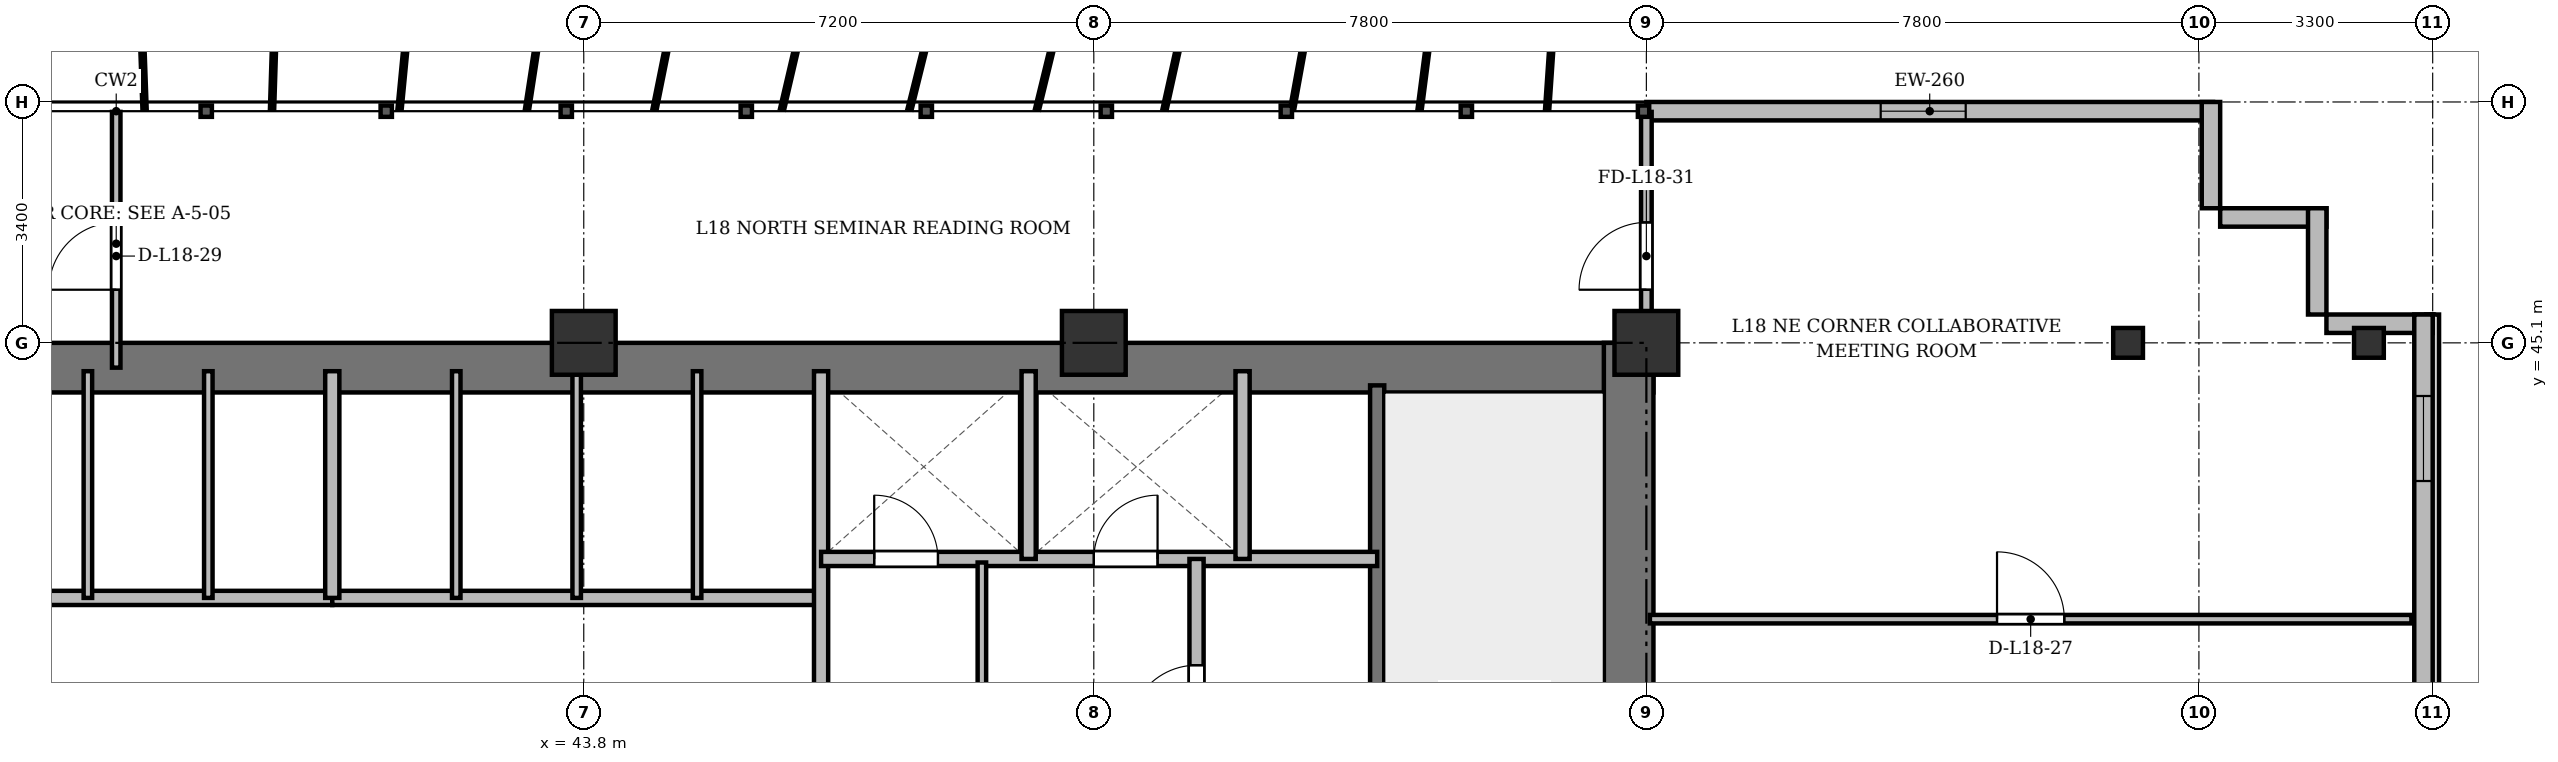
"""IFC4 building model, lengths in metres.
Left out: names, types, materials, properties, quantities, classifications, styles, units other than length and angle.
Written with IfcOpenShell. Run it as: python <this file> out.ifc"""

import sys

from ifc_helpers import new_model, si_unit, direction, frame, frame_2d, origin, origin_2d, place, context, subcontext, project, spatial, rectangle, i_section, extrude, source, transform, mapped, element, fill, save


model = new_model("IFC4")
c1 = context("Model", 3, precision=1e-05, world=origin(), true_north=direction((0.0, 1.0)))
c2 = subcontext(c1, "Body", "Model", "MODEL_VIEW")
j1 = project(units=[si_unit("LENGTHUNIT", "METRE"), si_unit("PLANEANGLEUNIT", "RADIAN")], contexts=[c1])
p1 = place(None, origin())
s1 = spatial("IfcSite", under=j1, at=p1, CompositionType="ELEMENT")
p2 = place(p1, origin())
s2 = spatial("IfcBuilding", under=s1, at=p2, CompositionType="ELEMENT")
p3 = place(p2, frame((0.0, 0.0, 70.3)))
s3 = spatial("IfcBuildingStorey", under=s2, at=p3, CompositionType="ELEMENT", Elevation=70.3)
m1 = source(origin(), c2, "Body", "SweptSolid", [
    extrude(rectangle(XDim=0.9, YDim=0.9, at=origin_2d()), origin(), (0.0, 0.0, 1.0), 3.6),
])
for number, where, z_axis, x_axis in (
    (1, (43.8, 45.1, 0.0), (0.0, 0.0, 1.0), (1.0, 0.0, 0.0)),
    (2, (51.0, 45.1, 0.0), (0.0, 0.0, 1.0), (1.0, 0.0, 0.0)),
    (3, (58.8, 45.1, 0.0), (0.0, 0.0, 1.0), (1.0, 0.0, 0.0)),
):
    element("IfcColumn", number, at=place(p3, frame(where, z_axis=z_axis, x_axis=x_axis)), inside=s3, PredefinedType="COLUMN", context=c2, shape_type="MappedRepresentation", body=[
        mapped(m1, transform((0.0, 0.0, 0.0), x_axis=(1.0, 0.0, 0.0), y_axis=(0.0, 1.0, 0.0), z_axis=(0.0, 0.0, 1.0), scale=1.0)),
    ])
m2 = source(origin(), c2, "Body", "SweptSolid", [
    extrude(i_section(OverallWidth=0.42, OverallDepth=0.42, WebThickness=0.026, FlangeThickness=0.04, at=origin_2d()), origin(), (0.0, 0.0, 1.0), 3.6),
])
for number, where, z_axis, x_axis in (
    (4, (65.6, 45.1, 0.0), (0.0, 0.0, 1.0), (1.0, 0.0, 0.0)),
    (5, (69.0, 45.1, 0.0), (0.0, 0.0, 1.0), (1.0, 0.0, 0.0)),
):
    element("IfcColumn", number, at=place(p3, frame(where, z_axis=z_axis, x_axis=x_axis)), inside=s3, PredefinedType="COLUMN", context=c2, shape_type="MappedRepresentation", body=[
        mapped(m2, transform((0.0, 0.0, 0.0), x_axis=(1.0, 0.0, 0.0), y_axis=(0.0, 1.0, 0.0), z_axis=(0.0, 0.0, 1.0), scale=1.0)),
    ])
p4 = place(p3, frame((58.8, 48.37, 0.0), z_axis=(0.0, 0.0, 1.0), x_axis=(1.0, 0.0, 0.0)))
e6 = element("IfcWall", 6, at=p4, inside=s3, PredefinedType="SOLIDWALL", context=c2, shape_type="SweptSolid", body=[
    extrude(rectangle(XDim=8.0, YDim=0.26, at=frame_2d((4.0, 0.0))), origin(), (0.0, 0.0, 1.0), 3.22),
])
p5 = place(p4, frame((3.308, 0.0, 0.9)))
e7 = element("IfcOpeningElement", 7, at=p5, cuts=e6, PredefinedType="OPENING", context=c2, shape_type="SweptSolid", body=[
    extrude(rectangle(XDim=1.2, YDim=1.65, at=frame_2d((0.6, 0.825))), frame((0.0, 0.14, 0.0), z_axis=(0.0, -1.0, 0.0), x_axis=(1.0, 0.0, 0.0)), (0.0, 0.0, 1.0), 0.28),
])
for number, where, z_axis, x_axis in (
    (8, (66.77, 48.5, 0.0), (0.0, 0.0, 1.0), (0.0, -1.0, 0.0)),
    (9, (66.9, 46.87, 0.0), (0.0, 0.0, 1.0), (1.0, 0.0, 0.0)),
    (10, (68.27, 47.0, 0.0), (0.0, 0.0, 1.0), (0.0, -1.0, 0.0)),
):
    element("IfcWall", number, at=place(p3, frame(where, z_axis=z_axis, x_axis=x_axis)), inside=s3, PredefinedType="SOLIDWALL", context=c2, shape_type="SweptSolid", body=[
        extrude(rectangle(XDim=1.5, YDim=0.26, at=frame_2d((0.75, 0.0))), origin(), (0.0, 0.0, 1.0), 3.22),
    ])
p6 = place(p3, frame((68.4, 45.37, 0.0), z_axis=(0.0, 0.0, 1.0), x_axis=(1.0, 0.0, 0.0)))
e11 = element("IfcWall", 11, at=p6, inside=s3, PredefinedType="SOLIDWALL", context=c2, shape_type="SweptSolid", body=[
    extrude(rectangle(XDim=1.5, YDim=0.26, at=frame_2d((0.75, 0.0))), origin(), (0.0, 0.0, 1.0), 2.57),
])
p7 = place(p3, frame((69.77, 45.5, 0.0), z_axis=(0.0, 0.0, 1.0), x_axis=(0.0, -1.0, 0.0)))
e12 = element("IfcWall", 12, at=p7, inside=s3, PredefinedType="SOLIDWALL", context=c2, shape_type="SweptSolid", body=[
    extrude(rectangle(XDim=39.6, YDim=0.26, at=frame_2d((19.8, 0.0))), origin(), (0.0, 0.0, 1.0), 3.22),
])
p8 = place(p7, frame((36.95, 0.0, 0.92)))
e13 = element("IfcOpeningElement", 13, at=p8, cuts=e12, PredefinedType="OPENING", context=c2, shape_type="SweptSolid", body=[
    extrude(rectangle(XDim=1.2, YDim=1.65, at=frame_2d((0.6, 0.825))), frame((0.0, 0.14, 0.0), z_axis=(0.0, -1.0, 0.0), x_axis=(1.0, 0.0, 0.0)), (0.0, 0.0, 1.0), 0.28),
])
p9 = place(p7, frame((32.8, 0.0, 0.92)))
e14 = element("IfcOpeningElement", 14, at=p9, cuts=e12, PredefinedType="OPENING", context=c2, shape_type="SweptSolid", body=[
    extrude(rectangle(XDim=2.6, YDim=1.9, at=frame_2d((1.3, 0.95))), frame((0.0, 0.14, 0.0), z_axis=(0.0, -1.0, 0.0), x_axis=(1.0, 0.0, 0.0)), (0.0, 0.0, 1.0), 0.28),
])
p10 = place(p7, frame((28.6, 0.0, 0.92)))
e15 = element("IfcOpeningElement", 15, at=p10, cuts=e12, PredefinedType="OPENING", context=c2, shape_type="SweptSolid", body=[
    extrude(rectangle(XDim=2.6, YDim=1.9, at=frame_2d((1.3, 0.95))), frame((0.0, 0.14, 0.0), z_axis=(0.0, -1.0, 0.0), x_axis=(1.0, 0.0, 0.0)), (0.0, 0.0, 1.0), 0.28),
])
p11 = place(p7, frame((7.4, 0.0, 0.92)))
e16 = element("IfcOpeningElement", 16, at=p11, cuts=e12, PredefinedType="OPENING", context=c2, shape_type="SweptSolid", body=[
    extrude(rectangle(XDim=2.6, YDim=1.9, at=frame_2d((1.3, 0.95))), frame((0.0, 0.14, 0.0), z_axis=(0.0, -1.0, 0.0), x_axis=(1.0, 0.0, 0.0)), (0.0, 0.0, 1.0), 0.28),
])
p12 = place(p7, frame((1.15, 0.0, 0.92)))
e17 = element("IfcOpeningElement", 17, at=p12, cuts=e12, PredefinedType="OPENING", context=c2, shape_type="SweptSolid", body=[
    extrude(rectangle(XDim=1.2, YDim=1.65, at=frame_2d((0.6, 0.825))), frame((0.0, 0.14, 0.0), z_axis=(0.0, -1.0, 0.0), x_axis=(1.0, 0.0, 0.0)), (0.0, 0.0, 1.0), 0.28),
])
p13 = place(p3, frame((15.5, 44.75, 0.0), z_axis=(0.0, 0.0, 1.0), x_axis=(1.0, 0.0, 0.0)))
e18 = element("IfcWall", 18, at=p13, inside=s3, PredefinedType="SHEAR", context=c2, shape_type="SweptSolid", body=[
    extrude(rectangle(XDim=43.4, YDim=0.7, at=frame_2d((21.7, 0.0))), origin(), (0.0, 0.0, 1.0), 3.22),
])
p14 = place(p3, frame((58.55, 33.4, 0.0), z_axis=(0.0, 0.0, 1.0), x_axis=(0.0, 1.0, 0.0)))
e19 = element("IfcWall", 19, at=p14, inside=s3, PredefinedType="SHEAR", context=c2, shape_type="SweptSolid", body=[
    extrude(rectangle(XDim=11.7, YDim=0.7, at=frame_2d((5.85, 0.0))), origin(), (0.0, 0.0, 1.0), 3.22),
])
p15 = place(p3, frame((55.0, 33.4, 0.0), z_axis=(0.0, 0.0, 1.0), x_axis=(0.0, 1.0, 0.0)))
e20 = element("IfcWall", 20, at=p15, inside=s3, PredefinedType="SHEAR", context=c2, shape_type="SweptSolid", body=[
    extrude(rectangle(XDim=11.1, YDim=0.2, at=frame_2d((5.55, 0.0))), origin(), (0.0, 0.0, 1.0), 3.22),
])
p16 = place(p15, frame((0.85, 0.0, 0.0)))
e21 = element("IfcOpeningElement", 21, at=p16, cuts=e20, PredefinedType="OPENING", context=c2, shape_type="SweptSolid", body=[
    extrude(rectangle(XDim=1.1, YDim=2.15, at=frame_2d((0.55, 1.075))), frame((0.0, 0.11, 0.0), z_axis=(0.0, -1.0, 0.0), x_axis=(1.0, 0.0, 0.0)), (0.0, 0.0, 1.0), 0.22),
])
p17 = place(p3, frame((33.35, 41.5, 0.0), z_axis=(0.0, 0.0, 1.0), x_axis=(1.0, 0.0, 0.0)))
e22 = element("IfcWall", 22, at=p17, inside=s3, PredefinedType="SOLIDWALL", context=c2, shape_type="SweptSolid", body=[
    extrude(rectangle(XDim=6.9, YDim=0.2, at=frame_2d((3.45, 0.0))), origin(), (0.0, 0.0, 1.0), 3.22),
])
for number, where, z_axis, x_axis in (
    (23, (36.8, 41.5, 0.0), (0.0, 0.0, 1.0), (0.0, 1.0, 0.0)),
    (24, (38.5, 41.5, 0.0), (0.0, 0.0, 1.0), (0.0, 1.0, 0.0)),
):
    element("IfcWall", number, at=place(p3, frame(where, z_axis=z_axis, x_axis=x_axis)), inside=s3, PredefinedType="PARTITIONING", context=c2, shape_type="SweptSolid", body=[
        extrude(rectangle(XDim=3.2, YDim=0.12, at=frame_2d((1.6, 0.0))), origin(), (0.0, 0.0, 1.0), 3.22),
    ])
p18 = place(p3, frame((40.25, 41.5, 0.0), z_axis=(0.0, 0.0, 1.0), x_axis=(1.0, 0.0, 0.0)))
e25 = element("IfcWall", 25, at=p18, inside=s3, PredefinedType="SOLIDWALL", context=c2, shape_type="SweptSolid", body=[
    extrude(rectangle(XDim=6.9, YDim=0.2, at=frame_2d((3.45, 0.0))), origin(), (0.0, 0.0, 1.0), 2.632),
])
p19 = place(p3, frame((40.25, 41.5, 0.0), z_axis=(0.0, 0.0, 1.0), x_axis=(0.0, 1.0, 0.0)))
e26 = element("IfcWall", 26, at=p19, inside=s3, PredefinedType="SOLIDWALL", context=c2, shape_type="SweptSolid", body=[
    extrude(rectangle(XDim=3.2, YDim=0.2, at=frame_2d((1.6, 0.0))), origin(), (0.0, 0.0, 1.0), 3.22),
])
p20 = place(p3, frame((42.0, 41.5, 0.0), z_axis=(0.0, 0.0, 1.0), x_axis=(0.0, 1.0, 0.0)))
e27 = element("IfcWall", 27, at=p20, inside=s3, PredefinedType="PARTITIONING", context=c2, shape_type="SweptSolid", body=[
    extrude(rectangle(XDim=3.2, YDim=0.12, at=frame_2d((1.6, 0.0))), origin(), (0.0, 0.0, 1.0), 3.22),
])
p21 = place(p3, frame((43.7, 41.5, 0.0), z_axis=(0.0, 0.0, 1.0), x_axis=(0.0, 1.0, 0.0)))
e28 = element("IfcWall", 28, at=p21, inside=s3, PredefinedType="PARTITIONING", context=c2, shape_type="SweptSolid", body=[
    extrude(rectangle(XDim=3.2, YDim=0.12, at=frame_2d((1.6, 0.0))), origin(), (0.0, 0.0, 1.0), 2.632),
])
p22 = place(p3, frame((45.4, 41.5, 0.0), z_axis=(0.0, 0.0, 1.0), x_axis=(0.0, 1.0, 0.0)))
e29 = element("IfcWall", 29, at=p22, inside=s3, PredefinedType="PARTITIONING", context=c2, shape_type="SweptSolid", body=[
    extrude(rectangle(XDim=3.2, YDim=0.12, at=frame_2d((1.6, 0.0))), origin(), (0.0, 0.0, 1.0), 3.22),
])
p23 = place(p3, frame((47.15, 33.4, 0.0), z_axis=(0.0, 0.0, 1.0), x_axis=(0.0, 1.0, 0.0)))
e30 = element("IfcWall", 30, at=p23, inside=s3, PredefinedType="SOLIDWALL", context=c2, shape_type="SweptSolid", body=[
    extrude(rectangle(XDim=11.3, YDim=0.2, at=frame_2d((5.65, 0.0))), origin(), (0.0, 0.0, 1.0), 2.57),
])
p24 = place(p3, frame((47.15, 42.05, 0.0), z_axis=(0.0, 0.0, 1.0), x_axis=(1.0, 0.0, 0.0)))
e31 = element("IfcWall", 31, at=p24, inside=s3, PredefinedType="SOLIDWALL", context=c2, shape_type="SweptSolid", body=[
    extrude(rectangle(XDim=7.85, YDim=0.2, at=frame_2d((3.925, 0.0))), origin(), (0.0, 0.0, 1.0), 2.632),
])
p25 = place(p24, frame((0.75, 0.0, 0.0)))
e32 = element("IfcOpeningElement", 32, at=p25, cuts=e31, PredefinedType="OPENING", context=c2, shape_type="SweptSolid", body=[
    extrude(rectangle(XDim=0.9, YDim=2.1, at=frame_2d((0.45, 1.05))), frame((0.0, 0.11, 0.0), z_axis=(0.0, -1.0, 0.0), x_axis=(1.0, 0.0, 0.0)), (0.0, 0.0, 1.0), 0.22),
])
p26 = place(p24, frame((3.85, 0.0, 0.0)))
e33 = element("IfcOpeningElement", 33, at=p26, cuts=e31, PredefinedType="OPENING", context=c2, shape_type="SweptSolid", body=[
    extrude(rectangle(XDim=0.9, YDim=2.1, at=frame_2d((0.45, 1.05))), frame((0.0, 0.11, 0.0), z_axis=(0.0, -1.0, 0.0), x_axis=(1.0, 0.0, 0.0)), (0.0, 0.0, 1.0), 0.22),
])
for number, where, z_axis, x_axis in (
    (34, (50.08, 42.05, 0.0), (0.0, 0.0, 1.0), (0.0, 1.0, 0.0)),
    (35, (53.1, 42.05, 0.0), (0.0, 0.0, 1.0), (0.0, 1.0, 0.0)),
):
    element("IfcWall", number, at=place(p3, frame(where, z_axis=z_axis, x_axis=x_axis)), inside=s3, PredefinedType="SOLIDWALL", context=c2, shape_type="SweptSolid", body=[
        extrude(rectangle(XDim=2.65, YDim=0.2, at=frame_2d((1.325, 0.0))), origin(), (0.0, 0.0, 1.0), 3.22),
    ])
p27 = place(p3, frame((52.45, 33.4, 0.0), z_axis=(0.0, 0.0, 1.0), x_axis=(0.0, 1.0, 0.0)))
e36 = element("IfcWall", 36, at=p27, inside=s3, PredefinedType="PARTITIONING", context=c2, shape_type="SweptSolid", body=[
    extrude(rectangle(XDim=8.65, YDim=0.2, at=frame_2d((4.325, 0.0))), origin(), (0.0, 0.0, 1.0), 2.57),
])
p28 = place(p27, frame((6.2, 0.0, 0.0)))
e37 = element("IfcOpeningElement", 37, at=p28, cuts=e36, PredefinedType="OPENING", context=c2, shape_type="SweptSolid", body=[
    extrude(rectangle(XDim=0.95, YDim=2.15, at=frame_2d((0.475, 1.075))), frame((0.0, 0.11, 0.0), z_axis=(0.0, -1.0, 0.0), x_axis=(1.0, 0.0, 0.0)), (0.0, 0.0, 1.0), 0.22),
])
p29 = place(p3, frame((49.42, 33.4, 0.0), z_axis=(0.0, 0.0, 1.0), x_axis=(0.0, 1.0, 0.0)))
e38 = element("IfcWall", 38, at=p29, inside=s3, PredefinedType="PARTITIONING", context=c2, shape_type="SweptSolid", body=[
    extrude(rectangle(XDim=8.6, YDim=0.12, at=frame_2d((4.3, 0.0))), origin(), (0.0, 0.0, 1.0), 2.57),
])
p30 = place(p29, frame((1.3, 0.0, 0.0)))
e39 = element("IfcOpeningElement", 39, at=p30, cuts=e38, PredefinedType="OPENING", context=c2, shape_type="SweptSolid", body=[
    extrude(rectangle(XDim=0.95, YDim=2.15, at=frame_2d((0.475, 1.075))), frame((0.0, 0.07, 0.0), z_axis=(0.0, -1.0, 0.0), x_axis=(1.0, 0.0, 0.0)), (0.0, 0.0, 1.0), 0.14),
])
p31 = place(p29, frame((5.5, 0.0, 0.0)))
e40 = element("IfcOpeningElement", 40, at=p31, cuts=e38, PredefinedType="OPENING", context=c2, shape_type="SweptSolid", body=[
    extrude(rectangle(XDim=0.95, YDim=2.15, at=frame_2d((0.475, 1.075))), frame((0.0, 0.07, 0.0), z_axis=(0.0, -1.0, 0.0), x_axis=(1.0, 0.0, 0.0)), (0.0, 0.0, 1.0), 0.14),
])
p32 = place(p3, frame((58.85, 41.2, 0.0), z_axis=(0.0, 0.0, 1.0), x_axis=(1.0, 0.0, 0.0)))
e41 = element("IfcWall", 41, at=p32, inside=s3, PredefinedType="PARTITIONING", context=c2, shape_type="SweptSolid", body=[
    extrude(rectangle(XDim=10.75, YDim=0.12, at=frame_2d((5.375, 0.0))), origin(), (0.0, 0.0, 1.0), 2.632),
])
p33 = place(p32, frame((4.9, 0.0, 0.0)))
e42 = element("IfcOpeningElement", 42, at=p33, cuts=e41, PredefinedType="OPENING", context=c2, shape_type="SweptSolid", body=[
    extrude(rectangle(XDim=0.95, YDim=2.15, at=frame_2d((0.475, 1.075))), frame((0.0, 0.07, 0.0), z_axis=(0.0, -1.0, 0.0), x_axis=(1.0, 0.0, 0.0)), (0.0, 0.0, 1.0), 0.14),
])
p34 = place(p3, frame((37.2, 44.75, 0.0), z_axis=(0.0, 0.0, 1.0), x_axis=(0.0, 1.0, 0.0)))
e43 = element("IfcWall", 43, at=p34, inside=s3, PredefinedType="PARTITIONING", context=c2, shape_type="SweptSolid", body=[
    extrude(rectangle(XDim=3.61, YDim=0.12, at=frame_2d((1.805, 0.0))), origin(), (0.0, 0.0, 1.0), 2.57),
])
p35 = place(p34, frame((1.1, 0.0, 0.0)))
e44 = element("IfcOpeningElement", 44, at=p35, cuts=e43, PredefinedType="OPENING", context=c2, shape_type="SweptSolid", body=[
    extrude(rectangle(XDim=0.95, YDim=2.15, at=frame_2d((0.475, 1.075))), frame((0.0, 0.07, 0.0), z_axis=(0.0, -1.0, 0.0), x_axis=(1.0, 0.0, 0.0)), (0.0, 0.0, 1.0), 0.14),
])
p36 = place(p3, frame((58.8, 44.75, 0.0), z_axis=(0.0, 0.0, 1.0), x_axis=(0.0, 1.0, 0.0)))
e45 = element("IfcWall", 45, at=p36, inside=s3, PredefinedType="PARTITIONING", context=c2, shape_type="SweptSolid", body=[
    extrude(rectangle(XDim=3.61, YDim=0.15, at=frame_2d((1.805, 0.0))), origin(), (0.0, 0.0, 1.0), 2.632),
])
p37 = place(p36, frame((1.1, 0.0, 0.0)))
e46 = element("IfcOpeningElement", 46, at=p37, cuts=e45, PredefinedType="OPENING", context=c2, shape_type="SweptSolid", body=[
    extrude(rectangle(XDim=0.95, YDim=2.15, at=frame_2d((0.475, 1.075))), frame((0.0, 0.085, 0.0), z_axis=(0.0, -1.0, 0.0), x_axis=(1.0, 0.0, 0.0)), (0.0, 0.0, 1.0), 0.17),
])
m3 = source(origin(), c2, "Body", "SweptSolid", [
    extrude(rectangle(XDim=1.2, YDim=1.65, at=frame_2d((0.6, 0.825))), frame((0.0, 0.03, 0.0), z_axis=(0.0, -1.0, 0.0), x_axis=(1.0, 0.0, 0.0)), (0.0, 0.0, 1.0), 0.06),
])
p38 = place(p5, origin())
e47 = element("IfcWindow", 47, at=p38, inside=s3, PartitioningType="SINGLE_PANEL", PredefinedType="WINDOW", context=c2, shape_type="MappedRepresentation", body=[
    mapped(m3, transform((0.0, 0.0, 0.0), x_axis=(1.0, 0.0, 0.0), y_axis=(0.0, 1.0, 0.0), z_axis=(0.0, 0.0, 1.0), scale=1.0)),
])
fill(e7, e47)
p39 = place(p12, origin())
e48 = element("IfcWindow", 48, at=p39, inside=s3, PartitioningType="SINGLE_PANEL", PredefinedType="WINDOW", context=c2, shape_type="MappedRepresentation", body=[
    mapped(m3, transform((0.0, 0.0, 0.0), x_axis=(1.0, 0.0, 0.0), y_axis=(0.0, 1.0, 0.0), z_axis=(0.0, 0.0, 1.0), scale=1.0)),
])
fill(e17, e48)
m4 = source(origin(), c2, "Body", "SweptSolid", [
    extrude(rectangle(XDim=0.9, YDim=2.1, at=frame_2d((0.45, 1.05))), frame((0.0, 0.025, 0.0), z_axis=(0.0, -1.0, 0.0), x_axis=(1.0, 0.0, 0.0)), (0.0, 0.0, 1.0), 0.05),
])
p40 = place(p25, origin())
e49 = element("IfcDoor", 49, at=p40, inside=s3, OperationType="SINGLE_SWING_LEFT", PredefinedType="DOOR", context=c2, shape_type="MappedRepresentation", body=[
    mapped(m4, transform((0.0, 0.0, 0.0), x_axis=(1.0, 0.0, 0.0), y_axis=(0.0, 1.0, 0.0), z_axis=(0.0, 0.0, 1.0), scale=1.0)),
])
fill(e32, e49)
p41 = place(p26, origin())
e50 = element("IfcDoor", 50, at=p41, inside=s3, OperationType="SINGLE_SWING_RIGHT", PredefinedType="DOOR", context=c2, shape_type="MappedRepresentation", body=[
    mapped(m4, transform((0.0, 0.0, 0.0), x_axis=(1.0, 0.0, 0.0), y_axis=(0.0, 1.0, 0.0), z_axis=(0.0, 0.0, 1.0), scale=1.0)),
])
fill(e33, e50)
m5 = source(origin(), c2, "Body", "SweptSolid", [
    extrude(rectangle(XDim=0.95, YDim=2.15, at=frame_2d((0.475, 1.075))), frame((0.0, 0.025, 0.0), z_axis=(0.0, -1.0, 0.0), x_axis=(1.0, 0.0, 0.0)), (0.0, 0.0, 1.0), 0.05),
])
p42 = place(p28, origin())
e51 = element("IfcDoor", 51, at=p42, inside=s3, OperationType="SINGLE_SWING_LEFT", PredefinedType="DOOR", context=c2, shape_type="MappedRepresentation", body=[
    mapped(m5, transform((0.0, 0.0, 0.0), x_axis=(1.0, 0.0, 0.0), y_axis=(0.0, 1.0, 0.0), z_axis=(0.0, 0.0, 1.0), scale=1.0)),
])
fill(e37, e51)
p43 = place(p33, origin())
e52 = element("IfcDoor", 52, at=p43, inside=s3, OperationType="SINGLE_SWING_LEFT", PredefinedType="DOOR", context=c2, shape_type="MappedRepresentation", body=[
    mapped(m5, transform((0.0, 0.0, 0.0), x_axis=(1.0, 0.0, 0.0), y_axis=(0.0, 1.0, 0.0), z_axis=(0.0, 0.0, 1.0), scale=1.0)),
])
fill(e42, e52)
p44 = place(p35, origin())
e53 = element("IfcDoor", 53, at=p44, inside=s3, OperationType="SINGLE_SWING_LEFT", PredefinedType="DOOR", context=c2, shape_type="MappedRepresentation", body=[
    mapped(m5, transform((0.0, 0.0, 0.0), x_axis=(1.0, 0.0, 0.0), y_axis=(0.0, 1.0, 0.0), z_axis=(0.0, 0.0, 1.0), scale=1.0)),
])
fill(e44, e53)
p45 = place(p37, origin())
e54 = element("IfcDoor", 54, at=p45, inside=s3, OperationType="SINGLE_SWING_LEFT", PredefinedType="DOOR", context=c2, shape_type="MappedRepresentation", body=[
    mapped(m5, transform((0.0, 0.0, 0.0), x_axis=(1.0, 0.0, 0.0), y_axis=(0.0, 1.0, 0.0), z_axis=(0.0, 0.0, 1.0), scale=1.0)),
])
fill(e46, e54)
save(model, sys.argv[1])
